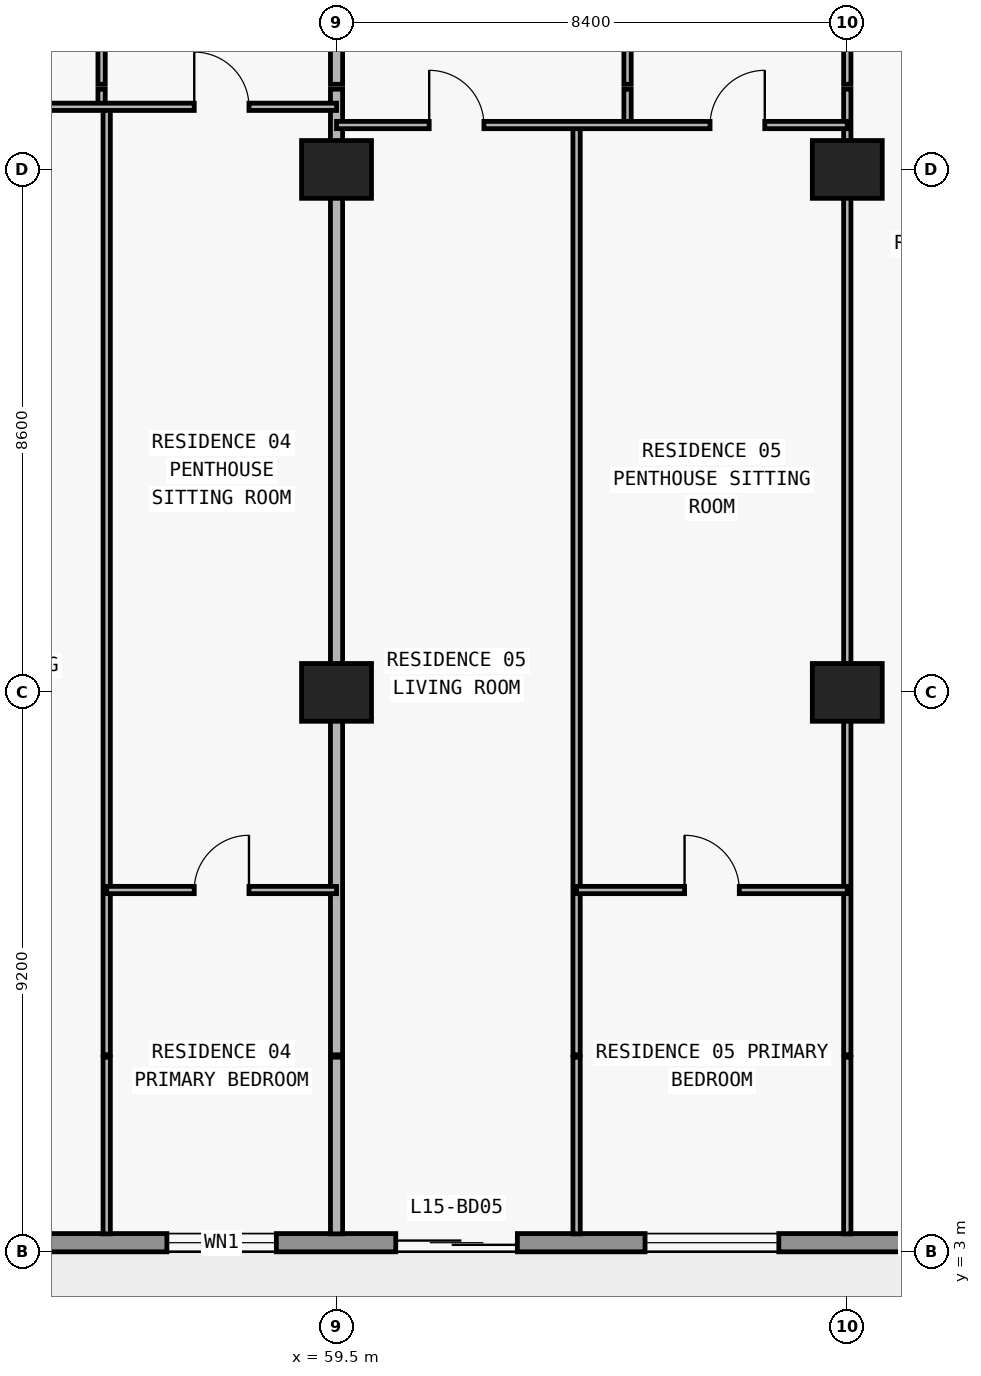
"""IFC4 building model, lengths in metres.
Left out: names, types, materials, properties, quantities, classifications, styles, units other than length and angle.
Written with IfcOpenShell. Run it as: python <this file> out.ifc"""

import sys

from ifc_helpers import new_model, si_unit, direction, frame, frame_2d, origin, origin_2d, place, context, subcontext, project, spatial, rectangle, extrude, element, fill, save


model = new_model("IFC4")
c1 = context("Model", 3, precision=1e-05, world=origin(), true_north=direction((0.0, 1.0)))
c2 = subcontext(c1, "Body", "Model", "MODEL_VIEW")
j1 = project(units=[si_unit("LENGTHUNIT", "METRE"), si_unit("PLANEANGLEUNIT", "RADIAN")], contexts=[c1])
p1 = place(None, origin())
s1 = spatial("IfcSite", under=j1, at=p1, CompositionType="ELEMENT")
p2 = place(p1, origin())
s2 = spatial("IfcBuilding", under=s1, at=p2, CompositionType="ELEMENT")
p3 = place(p2, frame((0.0, 0.0, 59.7)))
s3 = spatial("IfcBuildingStorey", under=s2, at=p3, CompositionType="ELEMENT", Elevation=59.7)
for number, where, z_axis, x_axis in (
    (1, (59.5, 12.2, 0.0), (0.0, 0.0, 1.0), (1.0, 0.0, 0.0)),
    (2, (67.9, 12.2, 0.0), (0.0, 0.0, 1.0), (1.0, 0.0, 0.0)),
    (3, (59.5, 20.8, 0.0), (0.0, 0.0, 1.0), (1.0, 0.0, 0.0)),
    (4, (67.9, 20.8, 0.0), (0.0, 0.0, 1.0), (1.0, 0.0, 0.0)),
):
    element("IfcColumn", number, at=place(p3, frame(where, z_axis=z_axis, x_axis=x_axis)), inside=s3, PredefinedType="COLUMN", context=c2, shape_type="SweptSolid", body=[
        extrude(rectangle(XDim=1.15, YDim=0.95, at=origin_2d()), origin(), (0.0, 0.0, 1.0), 3.05),
    ])
p4 = place(p3, frame((72.7, 3.15, 0.0), z_axis=(0.0, 0.0, 1.0), x_axis=(-1.0, 0.0, 0.0)))
e5 = element("IfcWall", 5, at=p4, inside=s3, PredefinedType="STANDARD", context=c2, shape_type="SweptSolid", body=[
    extrude(rectangle(XDim=67.6, YDim=0.3, at=frame_2d((33.8, 0.0))), origin(), (0.0, 0.0, 1.0), 3.05),
])
p5 = place(p4, frame((59.89, 0.0, 0.0)))
e6 = element("IfcOpeningElement", 6, at=p5, cuts=e5, PredefinedType="OPENING", context=c2, shape_type="SweptSolid", body=[
    extrude(rectangle(XDim=2.0, YDim=2.3, at=frame_2d((1.0, 1.15))), frame((0.0, 0.16, 0.0), z_axis=(0.0, -1.0, 0.0), x_axis=(1.0, 0.0, 0.0)), (0.0, 0.0, 1.0), 0.32),
])
p6 = place(p4, frame((55.21, 0.0, 0.65)))
e7 = element("IfcOpeningElement", 7, at=p6, cuts=e5, PredefinedType="OPENING", context=c2, shape_type="SweptSolid", body=[
    extrude(rectangle(XDim=2.6, YDim=1.85, at=frame_2d((1.3, 0.925))), frame((0.0, 0.16, 0.0), z_axis=(0.0, -1.0, 0.0), x_axis=(1.0, 0.0, 0.0)), (0.0, 0.0, 1.0), 0.32),
])
p7 = place(p4, frame((49.1, 0.0, 0.85)))
e8 = element("IfcOpeningElement", 8, at=p7, cuts=e5, PredefinedType="OPENING", context=c2, shape_type="SweptSolid", body=[
    extrude(rectangle(XDim=2.2, YDim=1.55, at=frame_2d((1.1, 0.775))), frame((0.0, 0.16, 0.0), z_axis=(0.0, -1.0, 0.0), x_axis=(1.0, 0.0, 0.0)), (0.0, 0.0, 1.0), 0.32),
])
p8 = place(p4, frame((43.09, 0.0, 0.0)))
e9 = element("IfcOpeningElement", 9, at=p8, cuts=e5, PredefinedType="OPENING", context=c2, shape_type="SweptSolid", body=[
    extrude(rectangle(XDim=2.0, YDim=2.3, at=frame_2d((1.0, 1.15))), frame((0.0, 0.16, 0.0), z_axis=(0.0, -1.0, 0.0), x_axis=(1.0, 0.0, 0.0)), (0.0, 0.0, 1.0), 0.32),
])
p9 = place(p4, frame((38.41, 0.0, 0.65)))
e10 = element("IfcOpeningElement", 10, at=p9, cuts=e5, PredefinedType="OPENING", context=c2, shape_type="SweptSolid", body=[
    extrude(rectangle(XDim=2.6, YDim=1.85, at=frame_2d((1.3, 0.925))), frame((0.0, 0.16, 0.0), z_axis=(0.0, -1.0, 0.0), x_axis=(1.0, 0.0, 0.0)), (0.0, 0.0, 1.0), 0.32),
])
p10 = place(p4, frame((32.7, 0.0, 0.85)))
e11 = element("IfcOpeningElement", 11, at=p10, cuts=e5, PredefinedType="OPENING", context=c2, shape_type="SweptSolid", body=[
    extrude(rectangle(XDim=2.2, YDim=1.55, at=frame_2d((1.1, 0.775))), frame((0.0, 0.16, 0.0), z_axis=(0.0, -1.0, 0.0), x_axis=(1.0, 0.0, 0.0)), (0.0, 0.0, 1.0), 0.32),
])
p11 = place(p4, frame((27.026, 0.0, 0.0)))
e12 = element("IfcOpeningElement", 12, at=p11, cuts=e5, PredefinedType="OPENING", context=c2, shape_type="SweptSolid", body=[
    extrude(rectangle(XDim=2.0, YDim=2.3, at=frame_2d((1.0, 1.15))), frame((0.0, 0.16, 0.0), z_axis=(0.0, -1.0, 0.0), x_axis=(1.0, 0.0, 0.0)), (0.0, 0.0, 1.0), 0.32),
])
p12 = place(p4, frame((22.726, 0.0, 0.85)))
e13 = element("IfcOpeningElement", 13, at=p12, cuts=e5, PredefinedType="OPENING", context=c2, shape_type="SweptSolid", body=[
    extrude(rectangle(XDim=2.2, YDim=1.55, at=frame_2d((1.1, 0.775))), frame((0.0, 0.16, 0.0), z_axis=(0.0, -1.0, 0.0), x_axis=(1.0, 0.0, 0.0)), (0.0, 0.0, 1.0), 0.32),
])
p13 = place(p4, frame((18.29, 0.0, 0.0)))
e14 = element("IfcOpeningElement", 14, at=p13, cuts=e5, PredefinedType="OPENING", context=c2, shape_type="SweptSolid", body=[
    extrude(rectangle(XDim=2.0, YDim=2.3, at=frame_2d((1.0, 1.15))), frame((0.0, 0.16, 0.0), z_axis=(0.0, -1.0, 0.0), x_axis=(1.0, 0.0, 0.0)), (0.0, 0.0, 1.0), 0.32),
])
p14 = place(p4, frame((14.19, 0.0, 0.85)))
e15 = element("IfcOpeningElement", 15, at=p14, cuts=e5, PredefinedType="OPENING", context=c2, shape_type="SweptSolid", body=[
    extrude(rectangle(XDim=1.8, YDim=1.55, at=frame_2d((0.9, 0.775))), frame((0.0, 0.16, 0.0), z_axis=(0.0, -1.0, 0.0), x_axis=(1.0, 0.0, 0.0)), (0.0, 0.0, 1.0), 0.32),
])
p15 = place(p4, frame((10.226, 0.0, 0.0)))
e16 = element("IfcOpeningElement", 16, at=p15, cuts=e5, PredefinedType="OPENING", context=c2, shape_type="SweptSolid", body=[
    extrude(rectangle(XDim=2.0, YDim=2.3, at=frame_2d((1.0, 1.15))), frame((0.0, 0.16, 0.0), z_axis=(0.0, -1.0, 0.0), x_axis=(1.0, 0.0, 0.0)), (0.0, 0.0, 1.0), 0.32),
])
p16 = place(p4, frame((5.926, 0.0, 0.85)))
e17 = element("IfcOpeningElement", 17, at=p16, cuts=e5, PredefinedType="OPENING", context=c2, shape_type="SweptSolid", body=[
    extrude(rectangle(XDim=2.2, YDim=1.55, at=frame_2d((1.1, 0.775))), frame((0.0, 0.16, 0.0), z_axis=(0.0, -1.0, 0.0), x_axis=(1.0, 0.0, 0.0)), (0.0, 0.0, 1.0), 0.32),
])
p17 = place(p3, frame((55.636, 21.83, 0.0), z_axis=(0.0, 0.0, 1.0), x_axis=(0.0, 1.0, 0.0)))
e18 = element("IfcWall", 18, at=p17, inside=s3, PredefinedType="PARTITIONING", context=c2, shape_type="SweptSolid", body=[
    extrude(rectangle(XDim=0.29, YDim=0.12, at=frame_2d((0.145, 0.0))), origin(), (0.0, 0.0, 1.0), 3.05),
])
p18 = place(p3, frame((55.636, 22.2, 0.0), z_axis=(0.0, 0.0, 1.0), x_axis=(0.0, 1.0, 0.0)))
e19 = element("IfcWall", 19, at=p18, inside=s3, PredefinedType="PARTITIONING", context=c2, shape_type="SweptSolid", body=[
    extrude(rectangle(XDim=4.38, YDim=0.12, at=frame_2d((2.19, 0.0))), origin(), (0.0, 0.0, 1.0), 3.05),
])
p19 = place(p18, frame((1.74, 0.0, 0.0)))
e20 = element("IfcOpeningElement", 20, at=p19, cuts=e19, PredefinedType="OPENING", context=c2, shape_type="SweptSolid", body=[
    extrude(rectangle(XDim=0.9, YDim=2.15, at=frame_2d((0.45, 1.075))), frame((0.0, 0.07, 0.0), z_axis=(0.0, -1.0, 0.0), x_axis=(1.0, 0.0, 0.0)), (0.0, 0.0, 1.0), 0.14),
])
p20 = place(p3, frame((55.72, 3.295, 0.0), z_axis=(0.0, 0.0, 1.0), x_axis=(0.0, 1.0, 0.0)))
e21 = element("IfcWall", 21, at=p20, inside=s3, PredefinedType="PARTITIONING", context=c2, shape_type="SweptSolid", body=[
    extrude(rectangle(XDim=2.905, YDim=0.12, at=frame_2d((1.453, 0.0))), origin(), (0.0, 0.0, 1.0), 3.05),
])
p21 = place(p3, frame((55.72, 6.24, 0.0), z_axis=(0.0, 0.0, 1.0), x_axis=(0.0, 1.0, 0.0)))
e22 = element("IfcWall", 22, at=p21, inside=s3, PredefinedType="PARTITIONING", context=c2, shape_type="SweptSolid", body=[
    extrude(rectangle(XDim=15.585, YDim=0.12, at=frame_2d((7.792, 0.0))), origin(), (0.0, 0.0, 1.0), 3.05),
])
p22 = place(p3, frame((59.5, 3.295, 0.0), z_axis=(0.0, 0.0, 1.0), x_axis=(0.0, 1.0, 0.0)))
e23 = element("IfcWall", 23, at=p22, inside=s3, PredefinedType="PARTITIONING", context=c2, shape_type="SweptSolid", body=[
    extrude(rectangle(XDim=2.905, YDim=0.2, at=frame_2d((1.453, 0.0))), origin(), (0.0, 0.0, 1.0), 3.05),
])
p23 = place(p3, frame((59.5, 6.24, 0.0), z_axis=(0.0, 0.0, 1.0), x_axis=(0.0, 1.0, 0.0)))
e24 = element("IfcWall", 24, at=p23, inside=s3, PredefinedType="PARTITIONING", context=c2, shape_type="SweptSolid", body=[
    extrude(rectangle(XDim=15.88, YDim=0.2, at=frame_2d((7.94, 0.0))), origin(), (0.0, 0.0, 1.0), 2.11),
])
p24 = place(p3, frame((59.5, 22.2, 0.0), z_axis=(0.0, 0.0, 1.0), x_axis=(0.0, 1.0, 0.0)))
e25 = element("IfcWall", 25, at=p24, inside=s3, PredefinedType="PARTITIONING", context=c2, shape_type="SweptSolid", body=[
    extrude(rectangle(XDim=4.38, YDim=0.2, at=frame_2d((2.19, 0.0))), origin(), (0.0, 0.0, 1.0), 2.11),
])
p25 = place(p3, frame((63.448, 3.295, 0.0), z_axis=(0.0, 0.0, 1.0), x_axis=(0.0, 1.0, 0.0)))
e26 = element("IfcWall", 26, at=p25, inside=s3, PredefinedType="PARTITIONING", context=c2, shape_type="SweptSolid", body=[
    extrude(rectangle(XDim=2.905, YDim=0.12, at=frame_2d((1.453, 0.0))), origin(), (0.0, 0.0, 1.0), 3.05),
])
p26 = place(p3, frame((63.448, 6.24, 0.0), z_axis=(0.0, 0.0, 1.0), x_axis=(0.0, 1.0, 0.0)))
e27 = element("IfcWall", 27, at=p26, inside=s3, PredefinedType="PARTITIONING", context=c2, shape_type="SweptSolid", body=[
    extrude(rectangle(XDim=15.29, YDim=0.12, at=frame_2d((7.645, 0.0))), origin(), (0.0, 0.0, 1.0), 3.05),
])
p27 = place(p3, frame((64.286, 21.53, 0.0), z_axis=(0.0, 0.0, 1.0), x_axis=(0.0, 1.0, 0.0)))
e28 = element("IfcWall", 28, at=p27, inside=s3, PredefinedType="PARTITIONING", context=c2, shape_type="SweptSolid", body=[
    extrude(rectangle(XDim=0.59, YDim=0.12, at=frame_2d((0.295, 0.0))), origin(), (0.0, 0.0, 1.0), 3.05),
])
p28 = place(p3, frame((64.286, 22.2, 0.0), z_axis=(0.0, 0.0, 1.0), x_axis=(0.0, 1.0, 0.0)))
e29 = element("IfcWall", 29, at=p28, inside=s3, PredefinedType="PARTITIONING", context=c2, shape_type="SweptSolid", body=[
    extrude(rectangle(XDim=4.38, YDim=0.12, at=frame_2d((2.19, 0.0))), origin(), (0.0, 0.0, 1.0), 3.05),
])
p29 = place(p28, frame((1.74, 0.0, 0.0)))
e30 = element("IfcOpeningElement", 30, at=p29, cuts=e29, PredefinedType="OPENING", context=c2, shape_type="SweptSolid", body=[
    extrude(rectangle(XDim=0.9, YDim=2.15, at=frame_2d((0.45, 1.075))), frame((0.0, 0.07, 0.0), z_axis=(0.0, -1.0, 0.0), x_axis=(1.0, 0.0, 0.0)), (0.0, 0.0, 1.0), 0.14),
])
p30 = place(p3, frame((67.9, 3.295, 0.0), z_axis=(0.0, 0.0, 1.0), x_axis=(0.0, 1.0, 0.0)))
e31 = element("IfcWall", 31, at=p30, inside=s3, PredefinedType="PARTITIONING", context=c2, shape_type="SweptSolid", body=[
    extrude(rectangle(XDim=2.905, YDim=0.12, at=frame_2d((1.453, 0.0))), origin(), (0.0, 0.0, 1.0), 3.05),
])
p31 = place(p3, frame((67.9, 6.24, 0.0), z_axis=(0.0, 0.0, 1.0), x_axis=(0.0, 1.0, 0.0)))
e32 = element("IfcWall", 32, at=p31, inside=s3, PredefinedType="PARTITIONING", context=c2, shape_type="SweptSolid", body=[
    extrude(rectangle(XDim=15.88, YDim=0.12, at=frame_2d((7.94, 0.0))), origin(), (0.0, 0.0, 1.0), 2.11),
])
p32 = place(p3, frame((67.9, 22.2, 0.0), z_axis=(0.0, 0.0, 1.0), x_axis=(0.0, 1.0, 0.0)))
e33 = element("IfcWall", 33, at=p32, inside=s3, PredefinedType="PARTITIONING", context=c2, shape_type="SweptSolid", body=[
    extrude(rectangle(XDim=4.38, YDim=0.12, at=frame_2d((2.19, 0.0))), origin(), (0.0, 0.0, 1.0), 2.11),
])
p33 = place(p32, frame((1.74, 0.0, 0.0)))
e34 = element("IfcOpeningElement", 34, at=p33, cuts=e33, PredefinedType="OPENING", context=c2, shape_type="SweptSolid", body=[
    extrude(rectangle(XDim=0.9, YDim=2.06, at=frame_2d((0.45, 1.03))), frame((0.0, 0.07, 0.0), z_axis=(0.0, -1.0, 0.0), x_axis=(1.0, 0.0, 0.0)), (0.0, 0.0, 1.0), 0.14),
])
p34 = place(p3, frame((55.72, 8.95, 0.0), z_axis=(0.0, 0.0, 1.0), x_axis=(1.0, 0.0, 0.0)))
e35 = element("IfcWall", 35, at=p34, inside=s3, PredefinedType="PARTITIONING", context=c2, shape_type="SweptSolid", body=[
    extrude(rectangle(XDim=3.78, YDim=0.12, at=frame_2d((1.89, 0.0))), origin(), (0.0, 0.0, 1.0), 3.05),
])
p35 = place(p34, frame((1.44, 0.0, 0.0)))
e36 = element("IfcOpeningElement", 36, at=p35, cuts=e35, PredefinedType="OPENING", context=c2, shape_type="SweptSolid", body=[
    extrude(rectangle(XDim=0.9, YDim=2.15, at=frame_2d((0.45, 1.075))), frame((0.0, 0.07, 0.0), z_axis=(0.0, -1.0, 0.0), x_axis=(1.0, 0.0, 0.0)), (0.0, 0.0, 1.0), 0.14),
])
p36 = place(p3, frame((63.448, 8.95, 0.0), z_axis=(0.0, 0.0, 1.0), x_axis=(1.0, 0.0, 0.0)))
e37 = element("IfcWall", 37, at=p36, inside=s3, PredefinedType="PARTITIONING", context=c2, shape_type="SweptSolid", body=[
    extrude(rectangle(XDim=4.452, YDim=0.12, at=frame_2d((2.226, 0.0))), origin(), (0.0, 0.0, 1.0), 3.05),
])
p37 = place(p36, frame((1.776, 0.0, 0.0)))
e38 = element("IfcOpeningElement", 38, at=p37, cuts=e37, PredefinedType="OPENING", context=c2, shape_type="SweptSolid", body=[
    extrude(rectangle(XDim=0.9, YDim=2.15, at=frame_2d((0.45, 1.075))), frame((0.0, 0.07, 0.0), z_axis=(0.0, -1.0, 0.0), x_axis=(1.0, 0.0, 0.0)), (0.0, 0.0, 1.0), 0.14),
])
p38 = place(p3, frame((59.5, 21.53, 0.0), z_axis=(0.0, 0.0, 1.0), x_axis=(1.0, 0.0, 0.0)))
e39 = element("IfcWall", 39, at=p38, inside=s3, PredefinedType="PARTITIONING", context=c2, shape_type="SweptSolid", body=[
    extrude(rectangle(XDim=8.4, YDim=0.12, at=frame_2d((4.2, 0.0))), origin(), (0.0, 0.0, 1.0), 3.05),
])
p39 = place(p38, frame((1.524, 0.0, 0.0)))
e40 = element("IfcOpeningElement", 40, at=p39, cuts=e39, PredefinedType="OPENING", context=c2, shape_type="SweptSolid", body=[
    extrude(rectangle(XDim=0.9, YDim=2.15, at=frame_2d((0.45, 1.075))), frame((0.0, 0.07, 0.0), z_axis=(0.0, -1.0, 0.0), x_axis=(1.0, 0.0, 0.0)), (0.0, 0.0, 1.0), 0.14),
])
p40 = place(p38, frame((6.143, 0.0, 0.0)))
e41 = element("IfcOpeningElement", 41, at=p40, cuts=e39, PredefinedType="OPENING", context=c2, shape_type="SweptSolid", body=[
    extrude(rectangle(XDim=0.9, YDim=2.15, at=frame_2d((0.45, 1.075))), frame((0.0, 0.07, 0.0), z_axis=(0.0, -1.0, 0.0), x_axis=(1.0, 0.0, 0.0)), (0.0, 0.0, 1.0), 0.14),
])
p41 = place(p3, frame((51.37, 21.83, 0.0), z_axis=(0.0, 0.0, 1.0), x_axis=(1.0, 0.0, 0.0)))
e42 = element("IfcWall", 42, at=p41, inside=s3, PredefinedType="PARTITIONING", context=c2, shape_type="SweptSolid", body=[
    extrude(rectangle(XDim=8.13, YDim=0.12, at=frame_2d((4.065, 0.0))), origin(), (0.0, 0.0, 1.0), 3.05),
])
p42 = place(p41, frame((1.683, 0.0, 0.0)))
e43 = element("IfcOpeningElement", 43, at=p42, cuts=e42, PredefinedType="OPENING", context=c2, shape_type="SweptSolid", body=[
    extrude(rectangle(XDim=0.9, YDim=2.15, at=frame_2d((0.45, 1.075))), frame((0.0, 0.07, 0.0), z_axis=(0.0, -1.0, 0.0), x_axis=(1.0, 0.0, 0.0)), (0.0, 0.0, 1.0), 0.14),
])
p43 = place(p41, frame((5.79, 0.0, 0.0)))
e44 = element("IfcOpeningElement", 44, at=p43, cuts=e42, PredefinedType="OPENING", context=c2, shape_type="SweptSolid", body=[
    extrude(rectangle(XDim=0.9, YDim=2.15, at=frame_2d((0.45, 1.075))), frame((0.0, 0.07, 0.0), z_axis=(0.0, -1.0, 0.0), x_axis=(1.0, 0.0, 0.0)), (0.0, 0.0, 1.0), 0.14),
])
p44 = place(p14, origin())
e45 = element("IfcWindow", 45, at=p44, inside=s3, PartitioningType="SINGLE_PANEL", PredefinedType="WINDOW", context=c2, shape_type="SweptSolid", body=[
    extrude(rectangle(XDim=1.8, YDim=1.55, at=frame_2d((0.9, 0.775))), frame((0.0, 0.03, 0.0), z_axis=(0.0, -1.0, 0.0), x_axis=(1.0, 0.0, 0.0)), (0.0, 0.0, 1.0), 0.06),
])
fill(e15, e45)
p45 = place(p15, origin())
e46 = element("IfcDoor", 46, at=p45, inside=s3, OperationType="DOUBLE_DOOR_SLIDING", PredefinedType="DOOR", context=c2, shape_type="SweptSolid", body=[
    extrude(rectangle(XDim=2.0, YDim=2.3, at=frame_2d((1.0, 1.15))), frame((0.0, 0.025, 0.0), z_axis=(0.0, -1.0, 0.0), x_axis=(1.0, 0.0, 0.0)), (0.0, 0.0, 1.0), 0.05),
])
fill(e16, e46)
p46 = place(p16, origin())
e47 = element("IfcWindow", 47, at=p46, inside=s3, PartitioningType="SINGLE_PANEL", PredefinedType="WINDOW", context=c2, shape_type="SweptSolid", body=[
    extrude(rectangle(XDim=2.2, YDim=1.55, at=frame_2d((1.1, 0.775))), frame((0.0, 0.03, 0.0), z_axis=(0.0, -1.0, 0.0), x_axis=(1.0, 0.0, 0.0)), (0.0, 0.0, 1.0), 0.06),
])
fill(e17, e47)
p47 = place(p43, origin())
e48 = element("IfcDoor", 48, at=p47, inside=s3, OperationType="SINGLE_SWING_LEFT", PredefinedType="DOOR", context=c2, shape_type="SweptSolid", body=[
    extrude(rectangle(XDim=0.9, YDim=2.15, at=frame_2d((0.45, 1.075))), frame((0.0, 0.025, 0.0), z_axis=(0.0, -1.0, 0.0), x_axis=(1.0, 0.0, 0.0)), (0.0, 0.0, 1.0), 0.05),
])
fill(e44, e48)
p48 = place(p35, origin())
e49 = element("IfcDoor", 49, at=p48, inside=s3, OperationType="SINGLE_SWING_RIGHT", PredefinedType="DOOR", context=c2, shape_type="SweptSolid", body=[
    extrude(rectangle(XDim=0.9, YDim=2.15, at=frame_2d((0.45, 1.075))), frame((0.0, 0.025, 0.0), z_axis=(0.0, -1.0, 0.0), x_axis=(1.0, 0.0, 0.0)), (0.0, 0.0, 1.0), 0.05),
])
fill(e36, e49)
p49 = place(p39, origin())
e50 = element("IfcDoor", 50, at=p49, inside=s3, OperationType="SINGLE_SWING_LEFT", PredefinedType="DOOR", context=c2, shape_type="SweptSolid", body=[
    extrude(rectangle(XDim=0.9, YDim=2.15, at=frame_2d((0.45, 1.075))), frame((0.0, 0.025, 0.0), z_axis=(0.0, -1.0, 0.0), x_axis=(1.0, 0.0, 0.0)), (0.0, 0.0, 1.0), 0.05),
])
fill(e40, e50)
p50 = place(p40, origin())
e51 = element("IfcDoor", 51, at=p50, inside=s3, OperationType="SINGLE_SWING_RIGHT", PredefinedType="DOOR", context=c2, shape_type="SweptSolid", body=[
    extrude(rectangle(XDim=0.9, YDim=2.15, at=frame_2d((0.45, 1.075))), frame((0.0, 0.025, 0.0), z_axis=(0.0, -1.0, 0.0), x_axis=(1.0, 0.0, 0.0)), (0.0, 0.0, 1.0), 0.05),
])
fill(e41, e51)
p51 = place(p37, origin())
e52 = element("IfcDoor", 52, at=p51, inside=s3, OperationType="SINGLE_SWING_LEFT", PredefinedType="DOOR", context=c2, shape_type="SweptSolid", body=[
    extrude(rectangle(XDim=0.9, YDim=2.15, at=frame_2d((0.45, 1.075))), frame((0.0, 0.025, 0.0), z_axis=(0.0, -1.0, 0.0), x_axis=(1.0, 0.0, 0.0)), (0.0, 0.0, 1.0), 0.05),
])
fill(e38, e52)
save(model, sys.argv[1])
